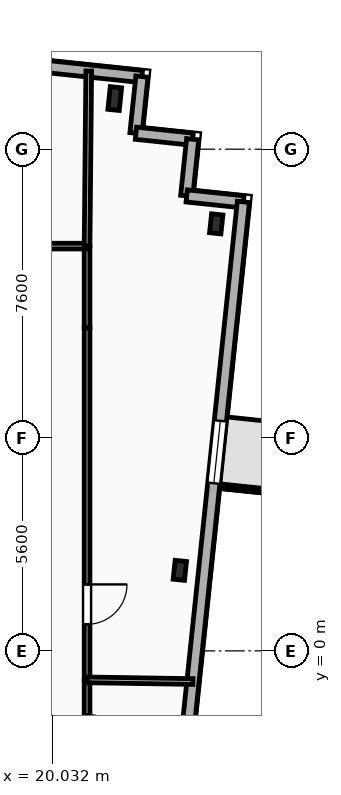
"""IFC4 building model, lengths in metres.
Left out: names, types, materials, properties, quantities, classifications, styles, units other than length and angle.
Written with IfcOpenShell. Run it as: python <this file> out.ifc"""

import sys

from ifc_helpers import new_model, si_unit, direction, frame, frame_2d, origin, origin_2d, place, context, subcontext, project, spatial, rectangle, i_section, extrude, element, fill, save


model = new_model("IFC4")
c1 = context("Model", 3, precision=1e-05, world=origin(), true_north=direction((0.0, 1.0)))
c2 = subcontext(c1, "Body", "Model", "MODEL_VIEW")
j1 = project(units=[si_unit("LENGTHUNIT", "METRE"), si_unit("PLANEANGLEUNIT", "RADIAN")], contexts=[c1])
p1 = place(None, origin())
s1 = spatial("IfcSite", under=j1, at=p1, CompositionType="ELEMENT")
p2 = place(p1, origin())
s2 = spatial("IfcBuilding", under=s1, at=p2, CompositionType="ELEMENT")
p3 = place(p2, frame((0.0, 0.0, 213.15)))
s3 = spatial("IfcBuildingStorey", under=s2, at=p3, CompositionType="ELEMENT", Elevation=213.15)
p4 = place(p3, frame((21.679, 14.532, 0.0), z_axis=(0.0, 0.0, 1.0), x_axis=(0.994521895368, -0.104528463268, 0.0)))
e1 = element("IfcColumn", 1, at=p4, inside=s3, PredefinedType="COLUMN", context=c2, shape_type="SweptSolid", body=[
    extrude(i_section(OverallWidth=0.3, OverallDepth=0.6, WebThickness=0.015, FlangeThickness=0.03, FilletRadius=0.027, at=origin_2d()), origin(), (0.0, 0.0, 1.0), 3.35),
])
for number, where, z_axis, x_axis in (
    (2, (23.391, 2.119, 0.0), (0.0, 0.0, 1.0), (0.995, -0.105, 0.0)),
    (3, (24.349, 11.235, 0.0), (0.0, 0.0, 1.0), (0.995, -0.105, 0.0)),
):
    element("IfcColumn", number, at=place(p3, frame(where, z_axis=z_axis, x_axis=x_axis)), inside=s3, PredefinedType="COLUMN", context=c2, shape_type="SweptSolid", body=[
        extrude(i_section(OverallWidth=0.3, OverallDepth=0.5, WebThickness=0.014, FlangeThickness=0.028, FilletRadius=0.027, at=origin_2d()), origin(), (0.0, 0.0, 1.0), 3.35),
    ])
p5 = place(p3, frame((-23.156, 19.898, 0.0), z_axis=(0.0, 0.0, 1.0), x_axis=(0.994522001802, -0.104527450613, 0.0)))
e4 = element("IfcWall", 4, at=p5, inside=s3, PredefinedType="SOLIDWALL", context=c2, shape_type="SweptSolid", body=[
    extrude(rectangle(XDim=45.8, YDim=0.32, at=frame_2d((22.9, 0.0))), origin(), (0.0, 0.0, 1.0), 3.04),
])
p6 = place(p5, frame((4.9, 0.0, 0.85)))
e5 = element("IfcOpeningElement", 5, at=p6, cuts=e4, PredefinedType="OPENING", context=c2, shape_type="SweptSolid", body=[
    extrude(rectangle(XDim=1.65, YDim=1.85, at=frame_2d((0.825, 0.925))), frame((0.0, 0.17, 0.0), z_axis=(0.0, -1.0, 0.0), x_axis=(1.0, 0.0, 0.0)), (0.0, 0.0, 1.0), 0.34),
])
p7 = place(p5, frame((11.706, 0.0, 0.85)))
e6 = element("IfcOpeningElement", 6, at=p7, cuts=e4, PredefinedType="OPENING", context=c2, shape_type="SweptSolid", body=[
    extrude(rectangle(XDim=1.65, YDim=1.85, at=frame_2d((0.825, 0.925))), frame((0.0, 0.17, 0.0), z_axis=(0.0, -1.0, 0.0), x_axis=(1.0, 0.0, 0.0)), (0.0, 0.0, 1.0), 0.34),
])
p8 = place(p5, frame((23.431, 0.0, 0.85)))
e7 = element("IfcOpeningElement", 7, at=p8, cuts=e4, PredefinedType="OPENING", context=c2, shape_type="SweptSolid", body=[
    extrude(rectangle(XDim=1.5, YDim=1.85, at=frame_2d((0.75, 0.925))), frame((0.0, 0.17, 0.0), z_axis=(0.0, -1.0, 0.0), x_axis=(1.0, 0.0, 0.0)), (0.0, 0.0, 1.0), 0.34),
])
p9 = place(p5, frame((34.628, 0.0, 0.85)))
e8 = element("IfcOpeningElement", 8, at=p9, cuts=e4, PredefinedType="OPENING", context=c2, shape_type="SweptSolid", body=[
    extrude(rectangle(XDim=1.65, YDim=1.85, at=frame_2d((0.825, 0.925))), frame((0.0, 0.17, 0.0), z_axis=(0.0, -1.0, 0.0), x_axis=(1.0, 0.0, 0.0)), (0.0, 0.0, 1.0), 0.34),
])
p10 = place(p3, frame((22.393, 15.111, 0.0), z_axis=(0.0, 0.0, 1.0), x_axis=(-0.104481464157, -0.994526834051, 0.0)))
e9 = element("IfcWall", 9, at=p10, inside=s3, PredefinedType="SOLIDWALL", context=c2, shape_type="SweptSolid", body=[
    extrude(rectangle(XDim=1.5, YDim=0.32, at=frame_2d((0.75, 0.0))), origin(), (0.0, 0.0, 1.0), 3.04),
])
for number, where, z_axis, x_axis in (
    (10, (22.237, 13.619, 0.0), (0.0, 0.0, 1.0), (0.995, -0.104, 0.0)),
    (11, (23.728, 13.462, 0.0), (0.0, 0.0, 1.0), (-0.104, -0.995, 0.0)),
    (12, (23.572, 11.971, 0.0), (0.0, 0.0, 1.0), (0.995, -0.105, 0.0)),
):
    element("IfcWall", number, at=place(p3, frame(where, z_axis=z_axis, x_axis=x_axis)), inside=s3, PredefinedType="SOLIDWALL", context=c2, shape_type="SweptSolid", body=[
        extrude(rectangle(XDim=1.5, YDim=0.32, at=frame_2d((0.75, 0.0))), origin(), (0.0, 0.0, 1.0), 3.04),
    ])
p11 = place(p3, frame((25.063, 11.814, 0.0), z_axis=(0.0, 0.0, 1.0), x_axis=(-0.104523275986, -0.99452244056, 0.0)))
e13 = element("IfcWall", 13, at=p11, inside=s3, PredefinedType="SOLIDWALL", context=c2, shape_type="SweptSolid", body=[
    extrude(rectangle(XDim=28.8, YDim=0.32, at=frame_2d((14.4, 0.0))), origin(), (0.0, 0.0, 1.0), 3.04),
])
p12 = place(p11, frame((5.793, 0.0, 0.85)))
e14 = element("IfcOpeningElement", 14, at=p12, cuts=e13, PredefinedType="OPENING", context=c2, shape_type="SweptSolid", body=[
    extrude(rectangle(XDim=1.65, YDim=1.85, at=frame_2d((0.825, 0.925))), frame((0.0, 0.17, 0.0), z_axis=(0.0, -1.0, 0.0), x_axis=(1.0, 0.0, 0.0)), (0.0, 0.0, 1.0), 0.34),
])
p13 = place(p11, frame((19.752, 0.0, 0.85)))
e15 = element("IfcOpeningElement", 15, at=p13, cuts=e13, PredefinedType="OPENING", context=c2, shape_type="SweptSolid", body=[
    extrude(rectangle(XDim=1.65, YDim=1.85, at=frame_2d((0.825, 0.925))), frame((0.0, 0.17, 0.0), z_axis=(0.0, -1.0, 0.0), x_axis=(1.0, 0.0, 0.0)), (0.0, 0.0, 1.0), 0.34),
])
p14 = place(p3, frame((20.95, 10.65, 0.0), z_axis=(0.0, 0.0, 1.0), x_axis=(0.0, -1.0, 0.0)))
e16 = element("IfcWall", 16, at=p14, inside=s3, PredefinedType="PARTITIONING", context=c2, shape_type="SweptSolid", body=[
    extrude(rectangle(XDim=2.15, YDim=0.15, at=frame_2d((1.075, 0.0))), origin(), (0.0, 0.0, 1.0), 3.04),
])
p15 = place(p3, frame((6.583, 10.65, 0.0), z_axis=(0.0, 0.0, 1.0), x_axis=(1.0, 0.0, 0.0)))
e17 = element("IfcWall", 17, at=p15, inside=s3, PredefinedType="PARTITIONING", context=c2, shape_type="SweptSolid", body=[
    extrude(rectangle(XDim=14.367, YDim=0.15, at=frame_2d((7.184, 0.0))), origin(), (0.0, 0.0, 1.0), 3.04),
])
p16 = place(p15, frame((9.698, 0.0, 0.0)))
e18 = element("IfcOpeningElement", 18, at=p16, cuts=e17, PredefinedType="OPENING", context=c2, shape_type="SweptSolid", body=[
    extrude(rectangle(XDim=1.05, YDim=2.15, at=frame_2d((0.525, 1.075))), frame((0.0, 0.085, 0.0), z_axis=(0.0, -1.0, 0.0), x_axis=(1.0, 0.0, 0.0)), (0.0, 0.0, 1.0), 0.17),
])
p17 = place(p3, frame((20.95, -0.763, 0.0), z_axis=(0.0, 0.0, 1.0), x_axis=(0.0, -1.0, 0.0)))
e19 = element("IfcWall", 19, at=p17, inside=s3, PredefinedType="PARTITIONING", context=c2, shape_type="SweptSolid", body=[
    extrude(rectangle(XDim=4.837, YDim=0.15, at=frame_2d((2.418, 0.0))), origin(), (0.0, 0.0, 1.0), 2.695),
])
p18 = place(p17, frame((0.908, 0.0, 0.0)))
e20 = element("IfcOpeningElement", 20, at=p18, cuts=e19, PredefinedType="OPENING", context=c2, shape_type="SweptSolid", body=[
    extrude(rectangle(XDim=1.05, YDim=2.15, at=frame_2d((0.525, 1.075))), frame((0.0, 0.085, 0.0), z_axis=(0.0, -1.0, 0.0), x_axis=(1.0, 0.0, 0.0)), (0.0, 0.0, 1.0), 0.17),
])
p19 = place(p3, frame((20.95, 8.5, 0.0), z_axis=(0.0, 0.0, 1.0), x_axis=(0.0, -1.0, 0.0)))
e21 = element("IfcWall", 21, at=p19, inside=s3, PredefinedType="PARTITIONING", context=c2, shape_type="SweptSolid", body=[
    extrude(rectangle(XDim=9.263, YDim=0.15, at=frame_2d((4.632, 0.0))), origin(), (0.0, 0.0, 1.0), 2.695),
])
p20 = place(p19, frame((6.751, 0.0, 0.0)))
e22 = element("IfcOpeningElement", 22, at=p20, cuts=e21, PredefinedType="OPENING", context=c2, shape_type="SweptSolid", body=[
    extrude(rectangle(XDim=1.05, YDim=2.15, at=frame_2d((0.525, 1.075))), frame((0.0, 0.085, 0.0), z_axis=(0.0, -1.0, 0.0), x_axis=(1.0, 0.0, 0.0)), (0.0, 0.0, 1.0), 0.17),
])
p21 = place(p3, frame((20.95, -0.763, 0.0), z_axis=(0.0, 0.0, 1.0), x_axis=(0.999875696831, -0.015766765259, 0.0)))
e23 = element("IfcWall", 23, at=p21, inside=s3, PredefinedType="PARTITIONING", context=c2, shape_type="SweptSolid", body=[
    extrude(rectangle(XDim=2.787, YDim=0.15, at=frame_2d((1.394, 0.0))), origin(), (0.0, 0.0, 1.0), 3.04),
])
p22 = place(p3, frame((20.95, 10.65, 0.0), z_axis=(0.0, 0.0, 1.0), x_axis=(0.009535990233, 0.999954531411, 0.0)))
e24 = element("IfcWall", 24, at=p22, inside=s3, PredefinedType="PARTITIONING", context=c2, shape_type="SweptSolid", body=[
    extrude(rectangle(XDim=4.608, YDim=0.15, at=frame_2d((2.304, 0.0))), origin(), (0.0, 0.0, 1.0), 2.665),
])
p23 = place(p12, origin())
e25 = element("IfcWindow", 25, at=p23, inside=s3, PartitioningType="SINGLE_PANEL", PredefinedType="WINDOW", context=c2, shape_type="SweptSolid", body=[
    extrude(rectangle(XDim=1.65, YDim=1.85, at=frame_2d((0.825, 0.925))), frame((0.0, 0.03, 0.0), z_axis=(0.0, -1.0, 0.0), x_axis=(1.0, 0.0, 0.0)), (0.0, 0.0, 1.0), 0.06),
])
fill(e14, e25)
p24 = place(p18, origin())
e26 = element("IfcDoor", 26, at=p24, inside=s3, OperationType="SINGLE_SWING_RIGHT", PredefinedType="DOOR", context=c2, shape_type="SweptSolid", body=[
    extrude(rectangle(XDim=1.05, YDim=2.15, at=frame_2d((0.525, 1.075))), frame((0.0, 0.025, 0.0), z_axis=(0.0, -1.0, 0.0), x_axis=(1.0, 0.0, 0.0)), (0.0, 0.0, 1.0), 0.05),
])
fill(e20, e26)
p25 = place(p20, origin())
e27 = element("IfcDoor", 27, at=p25, inside=s3, OperationType="SINGLE_SWING_LEFT", PredefinedType="DOOR", context=c2, shape_type="SweptSolid", body=[
    extrude(rectangle(XDim=1.05, YDim=2.15, at=frame_2d((0.525, 1.075))), frame((0.0, 0.025, 0.0), z_axis=(0.0, -1.0, 0.0), x_axis=(1.0, 0.0, 0.0)), (0.0, 0.0, 1.0), 0.05),
])
fill(e22, e27)
save(model, sys.argv[1])
